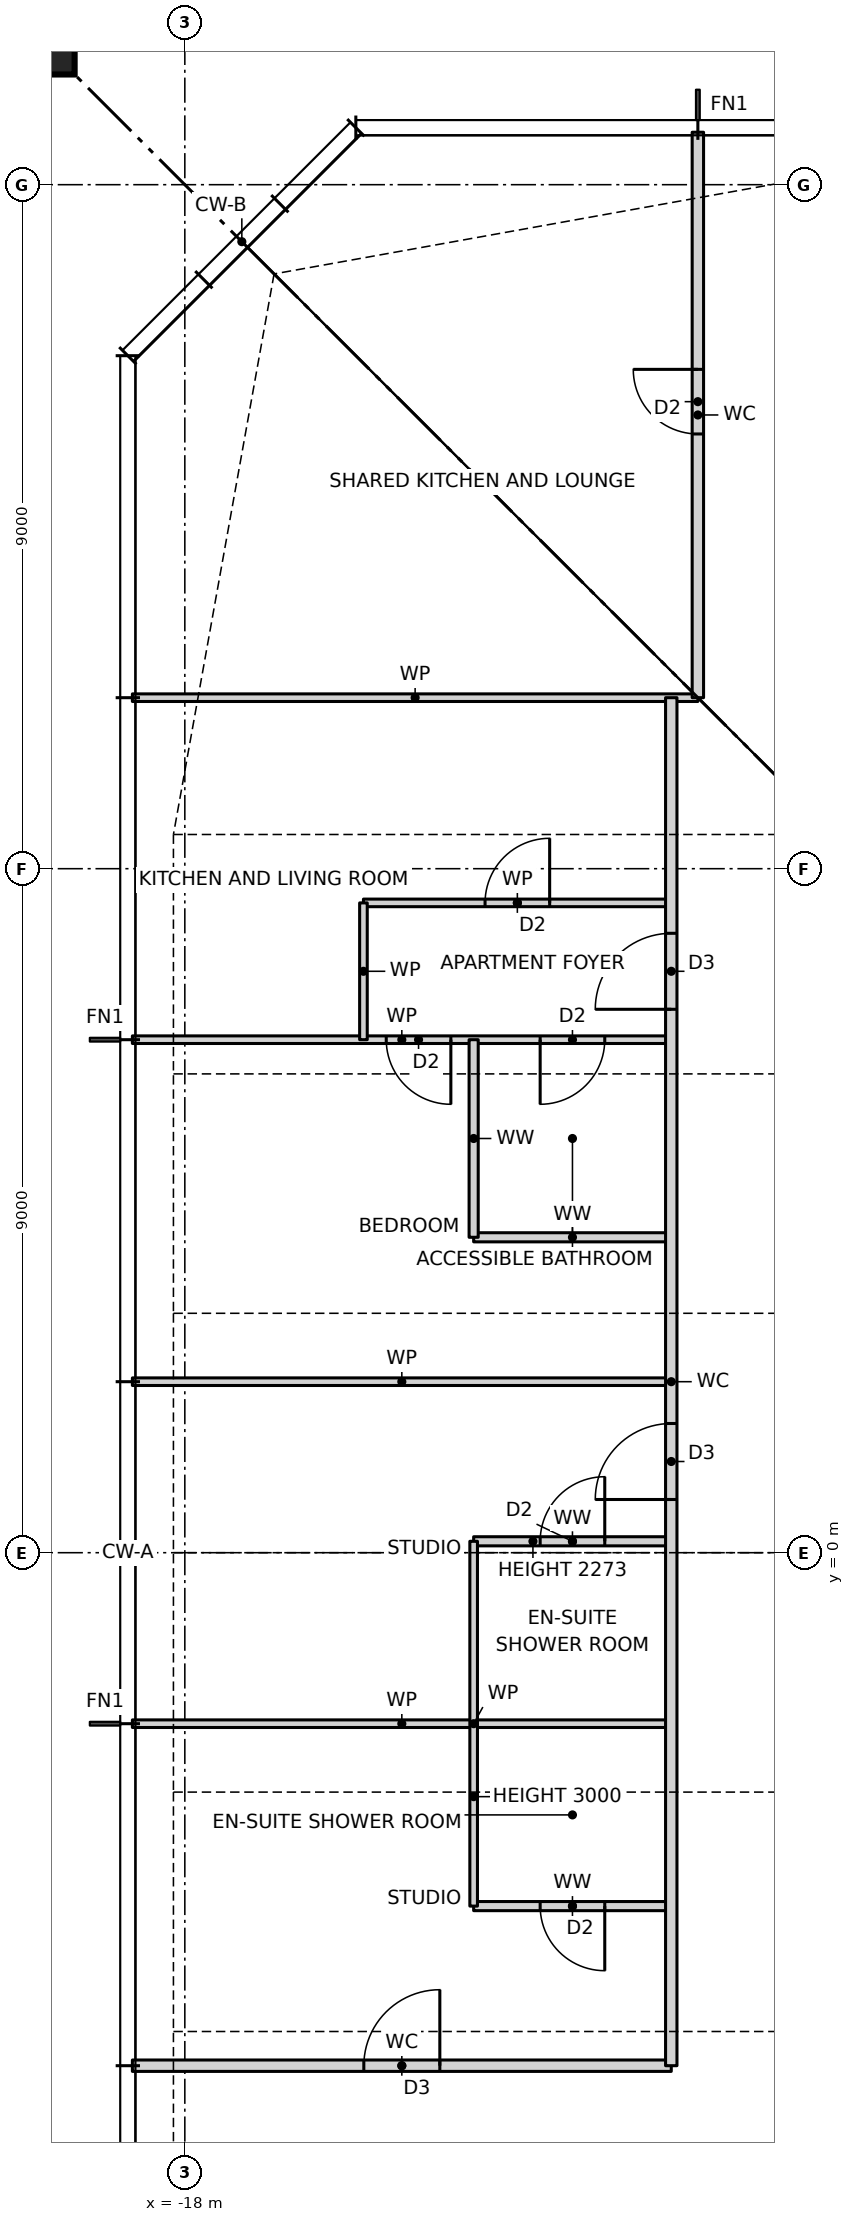
"""IFC4 building model, lengths in metres.
Left out: names, types, materials, properties, quantities, classifications, styles, units other than length and angle.
Written with IfcOpenShell. Run it as: python <this file> out.ifc"""

import sys

from ifc_helpers import new_model, si_unit, direction, frame, frame_2d, origin, origin_2d, place, context, subcontext, project, spatial, rectangle, i_section, extrude, element, fill, save


model = new_model("IFC4")
c1 = context("Model", 3, precision=1e-05, world=origin(), true_north=direction((0.0, 1.0)))
c2 = subcontext(c1, "Body", "Model", "MODEL_VIEW")
j1 = project(units=[si_unit("LENGTHUNIT", "METRE"), si_unit("PLANEANGLEUNIT", "RADIAN")], contexts=[c1])
p1 = place(None, origin())
s1 = spatial("IfcSite", under=j1, at=p1, CompositionType="ELEMENT")
p2 = place(p1, origin())
s2 = spatial("IfcBuilding", under=s1, at=p2, CompositionType="ELEMENT")
p3 = place(p2, frame((0.0, 0.0, 205.5)))
s3 = spatial("IfcBuildingStorey", under=s2, at=p3, CompositionType="ELEMENT", Elevation=205.5)
p4 = place(p3, frame((-21.65, 21.65, 0.0), z_axis=(0.0, 0.0, 1.0), x_axis=(1.0, 0.0, 0.0)))
e1 = element("IfcColumn", 1, at=p4, inside=s3, PredefinedType="COLUMN", context=c2, shape_type="SweptSolid", body=[
    extrude(rectangle(XDim=4.4, YDim=4.4, at=origin_2d()), origin(), (0.0, 0.0, 1.0), 3.5),
    extrude(i_section(OverallWidth=0.478, OverallDepth=0.599, WebThickness=0.1, FlangeThickness=0.14, at=origin_2d()), origin(), (0.0, 0.0, 1.0), 3.5),
])
p5 = place(p3, frame((-18.69, -6.75, 0.0), z_axis=(0.0, 0.0, 1.0), x_axis=(1.0, 0.0, 0.0)))
e2 = element("IfcWall", 2, at=p5, inside=s3, PredefinedType="PARTITIONING", context=c2, shape_type="SweptSolid", body=[
    extrude(rectangle(XDim=7.09, YDim=0.15, at=frame_2d((3.545, 0.0))), origin(), (0.0, 0.0, 1.0), 3.2),
])
p6 = place(p5, frame((3.045, 0.0, 0.0)))
e3 = element("IfcOpeningElement", 3, at=p6, cuts=e2, PredefinedType="OPENING", context=c2, shape_type="SweptSolid", body=[
    extrude(rectangle(XDim=1.0, YDim=2.1, at=frame_2d((0.5, 1.05))), frame((0.0, 0.085, 0.0), z_axis=(0.0, -1.0, 0.0), x_axis=(1.0, 0.0, 0.0)), (0.0, 0.0, 1.0), 0.17),
])
p7 = place(p3, frame((-14.2, -4.65, 0.0), z_axis=(0.0, 0.0, 1.0), x_axis=(1.0, 0.0, 0.0)))
e4 = element("IfcWall", 4, at=p7, inside=s3, PredefinedType="PARTITIONING", context=c2, shape_type="SweptSolid", body=[
    extrude(rectangle(XDim=2.6, YDim=0.12, at=frame_2d((1.3, 0.0))), origin(), (0.0, 0.0, 1.0), 3.2),
])
p8 = place(p7, frame((0.875, 0.0, 0.0)))
e5 = element("IfcOpeningElement", 5, at=p8, cuts=e4, PredefinedType="OPENING", context=c2, shape_type="SweptSolid", body=[
    extrude(rectangle(XDim=0.85, YDim=2.1, at=frame_2d((0.425, 1.05))), frame((0.0, 0.07, 0.0), z_axis=(0.0, -1.0, 0.0), x_axis=(1.0, 0.0, 0.0)), (0.0, 0.0, 1.0), 0.14),
])
p9 = place(p3, frame((-18.69, -2.25, 0.0), z_axis=(0.0, 0.0, 1.0), x_axis=(1.0, 0.0, 0.0)))
e6 = element("IfcWall", 6, at=p9, inside=s3, PredefinedType="PARTITIONING", context=c2, shape_type="SweptSolid", body=[
    extrude(rectangle(XDim=7.09, YDim=0.1, at=frame_2d((3.545, 0.0))), origin(), (0.0, 0.0, 1.0), 3.2),
])
p10 = place(p3, frame((-14.2, 0.15, 0.0), z_axis=(0.0, 0.0, 1.0), x_axis=(1.0, 0.0, 0.0)))
e7 = element("IfcWall", 7, at=p10, inside=s3, PredefinedType="PARTITIONING", context=c2, shape_type="SweptSolid", body=[
    extrude(rectangle(XDim=2.6, YDim=0.12, at=frame_2d((1.3, 0.0))), origin(), (0.0, 0.0, 1.0), 2.273),
])
p11 = place(p10, frame((0.875, 0.0, 0.0)))
e8 = element("IfcOpeningElement", 8, at=p11, cuts=e7, PredefinedType="OPENING", context=c2, shape_type="SweptSolid", body=[
    extrude(rectangle(XDim=0.85, YDim=2.1, at=frame_2d((0.425, 1.05))), frame((0.0, 0.07, 0.0), z_axis=(0.0, -1.0, 0.0), x_axis=(1.0, 0.0, 0.0)), (0.0, 0.0, 1.0), 0.14),
])
p12 = place(p3, frame((-18.69, 2.25, 0.0), z_axis=(0.0, 0.0, 1.0), x_axis=(1.0, 0.0, 0.0)))
e9 = element("IfcWall", 9, at=p12, inside=s3, PredefinedType="PARTITIONING", context=c2, shape_type="SweptSolid", body=[
    extrude(rectangle(XDim=7.09, YDim=0.1, at=frame_2d((3.545, 0.0))), origin(), (0.0, 0.0, 1.0), 3.2),
])
p13 = place(p3, frame((-14.2, 4.15, 0.0), z_axis=(0.0, 0.0, 1.0), x_axis=(1.0, 0.0, 0.0)))
e10 = element("IfcWall", 10, at=p13, inside=s3, PredefinedType="PARTITIONING", context=c2, shape_type="SweptSolid", body=[
    extrude(rectangle(XDim=2.6, YDim=0.12, at=frame_2d((1.3, 0.0))), origin(), (0.0, 0.0, 1.0), 3.2),
])
p14 = place(p3, frame((-18.69, 6.75, 0.0), z_axis=(0.0, 0.0, 1.0), x_axis=(1.0, 0.0, 0.0)))
e11 = element("IfcWall", 11, at=p14, inside=s3, PredefinedType="PARTITIONING", context=c2, shape_type="SweptSolid", body=[
    extrude(rectangle(XDim=7.09, YDim=0.1, at=frame_2d((3.545, 0.0))), origin(), (0.0, 0.0, 1.0), 3.2),
])
p15 = place(p14, frame((3.34, 0.0, 0.0)))
e12 = element("IfcOpeningElement", 12, at=p15, cuts=e11, PredefinedType="OPENING", context=c2, shape_type="SweptSolid", body=[
    extrude(rectangle(XDim=0.85, YDim=2.1, at=frame_2d((0.425, 1.05))), frame((0.0, 0.06, 0.0), z_axis=(0.0, -1.0, 0.0), x_axis=(1.0, 0.0, 0.0)), (0.0, 0.0, 1.0), 0.12),
])
p16 = place(p14, frame((5.365, 0.0, 0.0)))
e13 = element("IfcOpeningElement", 13, at=p16, cuts=e11, PredefinedType="OPENING", context=c2, shape_type="SweptSolid", body=[
    extrude(rectangle(XDim=0.85, YDim=2.1, at=frame_2d((0.425, 1.05))), frame((0.0, 0.06, 0.0), z_axis=(0.0, -1.0, 0.0), x_axis=(1.0, 0.0, 0.0)), (0.0, 0.0, 1.0), 0.12),
])
p17 = place(p3, frame((-15.65, 8.55, 0.0), z_axis=(0.0, 0.0, 1.0), x_axis=(1.0, 0.0, 0.0)))
e14 = element("IfcWall", 14, at=p17, inside=s3, PredefinedType="PARTITIONING", context=c2, shape_type="SweptSolid", body=[
    extrude(rectangle(XDim=4.05, YDim=0.1, at=frame_2d((2.025, 0.0))), origin(), (0.0, 0.0, 1.0), 3.2),
])
p18 = place(p17, frame((1.6, 0.0, 0.0)))
e15 = element("IfcOpeningElement", 15, at=p18, cuts=e14, PredefinedType="OPENING", context=c2, shape_type="SweptSolid", body=[
    extrude(rectangle(XDim=0.85, YDim=2.1, at=frame_2d((0.425, 1.05))), frame((0.0, 0.06, 0.0), z_axis=(0.0, -1.0, 0.0), x_axis=(1.0, 0.0, 0.0)), (0.0, 0.0, 1.0), 0.12),
])
p19 = place(p3, frame((-18.69, 11.25, 0.0), z_axis=(0.0, 0.0, 1.0), x_axis=(1.0, 0.0, 0.0)))
e16 = element("IfcWall", 16, at=p19, inside=s3, PredefinedType="PARTITIONING", context=c2, shape_type="SweptSolid", body=[
    extrude(rectangle(XDim=7.44, YDim=0.1, at=frame_2d((3.72, 0.0))), origin(), (0.0, 0.0, 1.0), 3.2),
])
p20 = place(p3, frame((-11.25, 11.25, 0.0), z_axis=(0.0, 0.0, 1.0), x_axis=(0.0, 1.0, 0.0)))
e17 = element("IfcWall", 17, at=p20, inside=s3, PredefinedType="PARTITIONING", context=c2, shape_type="SweptSolid", body=[
    extrude(rectangle(XDim=7.44, YDim=0.15, at=frame_2d((3.72, 0.0))), origin(), (0.0, 0.0, 1.0), 3.2),
])
p21 = place(p20, frame((3.47, 0.0, 0.0)))
e18 = element("IfcOpeningElement", 18, at=p21, cuts=e17, PredefinedType="OPENING", context=c2, shape_type="SweptSolid", body=[
    extrude(rectangle(XDim=0.85, YDim=2.1, at=frame_2d((0.425, 1.05))), frame((0.0, 0.085, 0.0), z_axis=(0.0, -1.0, 0.0), x_axis=(1.0, 0.0, 0.0)), (0.0, 0.0, 1.0), 0.17),
])
p22 = place(p3, frame((-11.6, -6.75, 0.0), z_axis=(0.0, 0.0, 1.0), x_axis=(0.0, 1.0, 0.0)))
e19 = element("IfcWall", 19, at=p22, inside=s3, PredefinedType="PARTITIONING", context=c2, shape_type="SweptSolid", body=[
    extrude(rectangle(XDim=18.0, YDim=0.15, at=frame_2d((9.0, 0.0))), origin(), (0.0, 0.0, 1.0), 3.2),
])
p23 = place(p22, frame((13.9, 0.0, 0.0)))
e20 = element("IfcOpeningElement", 20, at=p23, cuts=e19, PredefinedType="OPENING", context=c2, shape_type="SweptSolid", body=[
    extrude(rectangle(XDim=1.0, YDim=2.1, at=frame_2d((0.5, 1.05))), frame((0.0, 0.085, 0.0), z_axis=(0.0, -1.0, 0.0), x_axis=(1.0, 0.0, 0.0)), (0.0, 0.0, 1.0), 0.17),
])
p24 = place(p22, frame((7.45, 0.0, 0.0)))
e21 = element("IfcOpeningElement", 21, at=p24, cuts=e19, PredefinedType="OPENING", context=c2, shape_type="SweptSolid", body=[
    extrude(rectangle(XDim=1.0, YDim=2.1, at=frame_2d((0.5, 1.05))), frame((0.0, 0.085, 0.0), z_axis=(0.0, -1.0, 0.0), x_axis=(1.0, 0.0, 0.0)), (0.0, 0.0, 1.0), 0.17),
])
p25 = place(p3, frame((-14.2, -4.65, 0.0), z_axis=(0.0, 0.0, 1.0), x_axis=(0.0, 1.0, 0.0)))
e22 = element("IfcWall", 22, at=p25, inside=s3, PredefinedType="PARTITIONING", context=c2, shape_type="SweptSolid", body=[
    extrude(rectangle(XDim=4.8, YDim=0.1, at=frame_2d((2.4, 0.0))), origin(), (0.0, 0.0, 1.0), 3.0),
])
p26 = place(p3, frame((-14.2, 4.15, 0.0), z_axis=(0.0, 0.0, 1.0), x_axis=(0.0, 1.0, 0.0)))
e23 = element("IfcWall", 23, at=p26, inside=s3, PredefinedType="PARTITIONING", context=c2, shape_type="SweptSolid", body=[
    extrude(rectangle(XDim=2.6, YDim=0.12, at=frame_2d((1.3, 0.0))), origin(), (0.0, 0.0, 1.0), 3.2),
])
p27 = place(p3, frame((-15.65, 6.75, 0.0), z_axis=(0.0, 0.0, 1.0), x_axis=(0.0, 1.0, 0.0)))
e24 = element("IfcWall", 24, at=p27, inside=s3, PredefinedType="PARTITIONING", context=c2, shape_type="SweptSolid", body=[
    extrude(rectangle(XDim=1.8, YDim=0.1, at=frame_2d((0.9, 0.0))), origin(), (0.0, 0.0, 1.0), 3.2),
])
p28 = place(p23, origin())
e25 = element("IfcDoor", 25, at=p28, inside=s3, OperationType="SINGLE_SWING_LEFT", PredefinedType="DOOR", context=c2, shape_type="SweptSolid", body=[
    extrude(rectangle(XDim=1.0, YDim=2.1, at=frame_2d((0.5, 1.05))), frame((0.0, 0.025, 0.0), z_axis=(0.0, -1.0, 0.0), x_axis=(1.0, 0.0, 0.0)), (0.0, 0.0, 1.0), 0.05),
])
fill(e20, e25)
p29 = place(p18, origin())
e26 = element("IfcDoor", 26, at=p29, inside=s3, OperationType="SINGLE_SWING_RIGHT", PredefinedType="DOOR", context=c2, shape_type="SweptSolid", body=[
    extrude(rectangle(XDim=0.85, YDim=2.1, at=frame_2d((0.425, 1.05))), frame((0.0, 0.025, 0.0), z_axis=(0.0, -1.0, 0.0), x_axis=(1.0, 0.0, 0.0)), (0.0, 0.0, 1.0), 0.05),
])
fill(e15, e26)
p30 = place(p15, frame((0.85, 0.0, 0.0), z_axis=(0.0, 0.0, 1.0), x_axis=(-1.0, 0.0, 0.0)))
e27 = element("IfcDoor", 27, at=p30, inside=s3, OperationType="SINGLE_SWING_LEFT", PredefinedType="DOOR", context=c2, shape_type="SweptSolid", body=[
    extrude(rectangle(XDim=0.85, YDim=2.1, at=frame_2d((0.425, 1.05))), frame((0.0, 0.025, 0.0), z_axis=(0.0, -1.0, 0.0), x_axis=(1.0, 0.0, 0.0)), (0.0, 0.0, 1.0), 0.05),
])
fill(e12, e27)
p31 = place(p16, frame((0.85, 0.0, 0.0), z_axis=(0.0, 0.0, 1.0), x_axis=(-1.0, 0.0, 0.0)))
e28 = element("IfcDoor", 28, at=p31, inside=s3, OperationType="SINGLE_SWING_RIGHT", PredefinedType="DOOR", context=c2, shape_type="SweptSolid", body=[
    extrude(rectangle(XDim=0.85, YDim=2.1, at=frame_2d((0.425, 1.05))), frame((0.0, 0.025, 0.0), z_axis=(0.0, -1.0, 0.0), x_axis=(1.0, 0.0, 0.0)), (0.0, 0.0, 1.0), 0.05),
])
fill(e13, e28)
p32 = place(p24, origin())
e29 = element("IfcDoor", 29, at=p32, inside=s3, OperationType="SINGLE_SWING_LEFT", PredefinedType="DOOR", context=c2, shape_type="SweptSolid", body=[
    extrude(rectangle(XDim=1.0, YDim=2.1, at=frame_2d((0.5, 1.05))), frame((0.0, 0.025, 0.0), z_axis=(0.0, -1.0, 0.0), x_axis=(1.0, 0.0, 0.0)), (0.0, 0.0, 1.0), 0.05),
])
fill(e21, e29)
p33 = place(p11, origin())
e30 = element("IfcDoor", 30, at=p33, inside=s3, OperationType="SINGLE_SWING_RIGHT", PredefinedType="DOOR", context=c2, shape_type="SweptSolid", body=[
    extrude(rectangle(XDim=0.85, YDim=2.1, at=frame_2d((0.425, 1.05))), frame((0.0, 0.025, 0.0), z_axis=(0.0, -1.0, 0.0), x_axis=(1.0, 0.0, 0.0)), (0.0, 0.0, 1.0), 0.05),
])
fill(e8, e30)
p34 = place(p6, origin())
e31 = element("IfcDoor", 31, at=p34, inside=s3, OperationType="SINGLE_SWING_RIGHT", PredefinedType="DOOR", context=c2, shape_type="SweptSolid", body=[
    extrude(rectangle(XDim=1.0, YDim=2.1, at=frame_2d((0.5, 1.05))), frame((0.0, 0.025, 0.0), z_axis=(0.0, -1.0, 0.0), x_axis=(1.0, 0.0, 0.0)), (0.0, 0.0, 1.0), 0.05),
])
fill(e3, e31)
p35 = place(p8, frame((0.85, 0.0, 0.0), z_axis=(0.0, 0.0, 1.0), x_axis=(-1.0, 0.0, 0.0)))
e32 = element("IfcDoor", 32, at=p35, inside=s3, OperationType="SINGLE_SWING_LEFT", PredefinedType="DOOR", context=c2, shape_type="SweptSolid", body=[
    extrude(rectangle(XDim=0.85, YDim=2.1, at=frame_2d((0.425, 1.05))), frame((0.0, 0.025, 0.0), z_axis=(0.0, -1.0, 0.0), x_axis=(1.0, 0.0, 0.0)), (0.0, 0.0, 1.0), 0.05),
])
fill(e5, e32)
p36 = place(p21, origin())
e33 = element("IfcDoor", 33, at=p36, inside=s3, OperationType="SINGLE_SWING_RIGHT", PredefinedType="DOOR", context=c2, shape_type="SweptSolid", body=[
    extrude(rectangle(XDim=0.85, YDim=2.1, at=frame_2d((0.425, 1.05))), frame((0.0, 0.025, 0.0), z_axis=(0.0, -1.0, 0.0), x_axis=(1.0, 0.0, 0.0)), (0.0, 0.0, 1.0), 0.05),
])
fill(e18, e33)
save(model, sys.argv[1])
